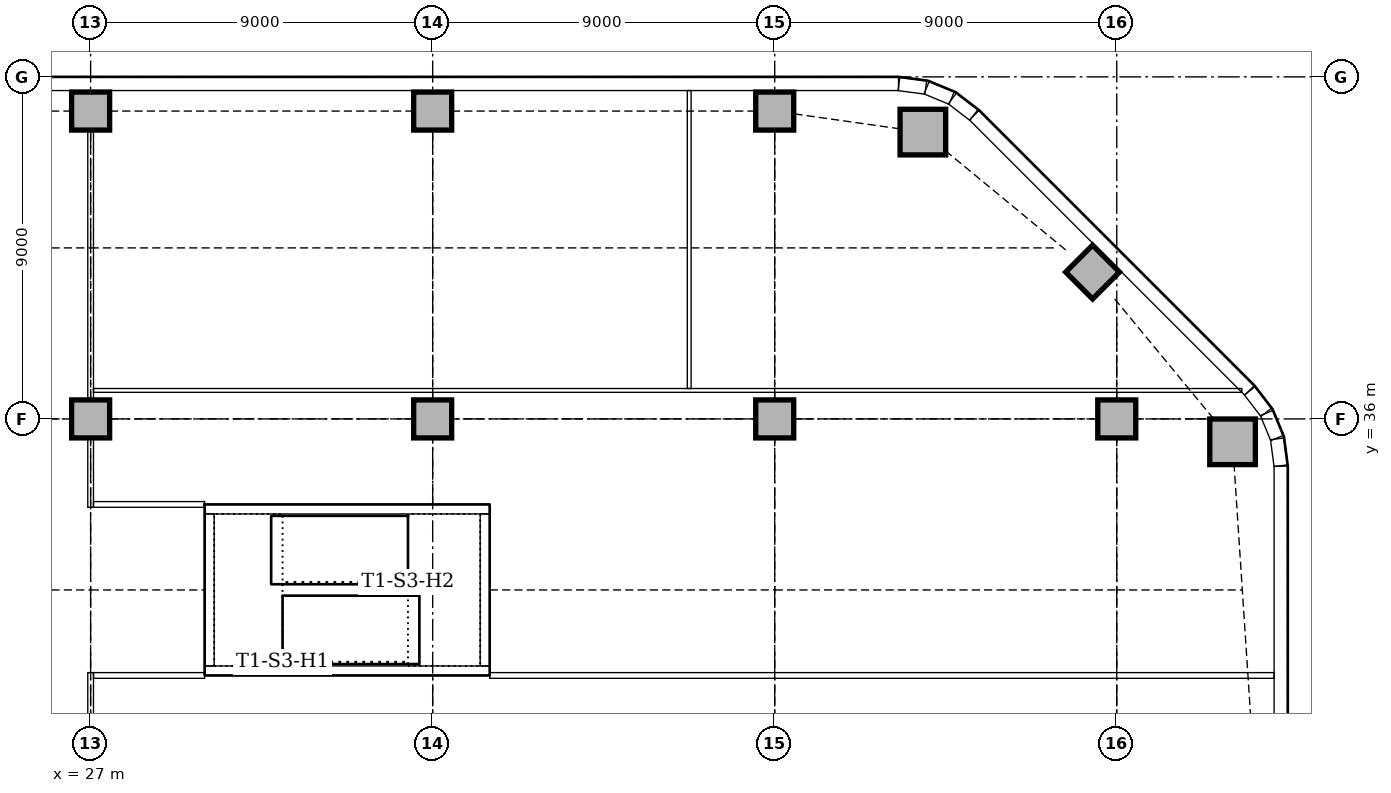
"""IFC4 building model, lengths in metres.
Left out: names, types, materials, properties, quantities, classifications, styles, units other than length and angle.
Written with IfcOpenShell. Run it as: python <this file> out.ifc"""

import sys

from ifc_helpers import new_model, si_unit, direction, frame, frame_2d, origin, origin_2d, place, context, subcontext, project, spatial, rectangle, extrude, element, fill, save


model = new_model("IFC4")
c1 = context("Model", 3, precision=1e-05, world=origin(), true_north=direction((0.0, 1.0)))
c2 = subcontext(c1, "Body", "Model", "MODEL_VIEW")
j1 = project(units=[si_unit("LENGTHUNIT", "METRE"), si_unit("PLANEANGLEUNIT", "RADIAN")], contexts=[c1])
p1 = place(None, origin())
s1 = spatial("IfcSite", under=j1, at=p1, CompositionType="ELEMENT")
p2 = place(p1, origin())
s2 = spatial("IfcBuilding", under=s1, at=p2, CompositionType="ELEMENT")
p3 = place(p2, frame((0.0, 0.0, 26.0)))
s3 = spatial("IfcBuildingStorey", under=s2, at=p3, CompositionType="ELEMENT", Elevation=26.0)
for number, where, z_axis, x_axis in (
    (1, (30.0, 29.375, 0.0), (0.0, 0.0, 1.0), (1.0, 0.0, 0.0)),
    (2, (37.5, 33.625, 0.0), (0.0, 0.0, 1.0), (-1.0, 0.0, 0.0)),
):
    element("IfcWall", number, at=place(p3, frame(where, z_axis=z_axis, x_axis=x_axis)), inside=s3, PredefinedType="SOLIDWALL", context=c2, shape_type="SweptSolid", body=[
        extrude(rectangle(XDim=7.5, YDim=0.25, at=frame_2d((3.75, 0.0))), origin(), (0.0, 0.0, 1.0), 4.0),
    ])
p4 = place(p3, frame((37.375, 29.5, 0.0), z_axis=(0.0, 0.0, 1.0), x_axis=(0.0, 1.0, 0.0)))
e3 = element("IfcWall", 3, at=p4, inside=s3, PredefinedType="SOLIDWALL", context=c2, shape_type="SweptSolid", body=[
    extrude(rectangle(XDim=4.0, YDim=0.25, at=frame_2d((2.0, 0.0))), origin(), (0.0, 0.0, 1.0), 4.0),
])
p5 = place(p3, frame((30.125, 33.5, 0.0), z_axis=(0.0, 0.0, 1.0), x_axis=(0.0, -1.0, 0.0)))
e4 = element("IfcWall", 4, at=p5, inside=s3, PredefinedType="SOLIDWALL", context=c2, shape_type="SweptSolid", body=[
    extrude(rectangle(XDim=4.0, YDim=0.25, at=frame_2d((2.0, 0.0))), origin(), (0.0, 0.0, 1.0), 4.0),
])
p6 = place(p5, frame((1.5, 0.0, 0.0)))
e5 = element("IfcOpeningElement", 5, at=p6, cuts=e4, PredefinedType="OPENING", context=c2, shape_type="SweptSolid", body=[
    extrude(rectangle(XDim=1.0, YDim=2.1, at=frame_2d((0.5, 1.05))), frame((0.0, 0.135, 0.0), z_axis=(0.0, -1.0, 0.0), x_axis=(1.0, 0.0, 0.0)), (0.0, 0.0, 1.0), 0.27),
])
for number, where, z_axis, x_axis in (
    (6, (57.047, 35.398, 0.0), (0.0, 0.0, 1.0), (1.0, 0.0, 0.0)),
    (7, (48.898, 43.547, 0.0), (0.0, 0.0, 1.0), (1.0, 0.0, 0.0)),
):
    element("IfcColumn", number, at=place(p3, frame(where, z_axis=z_axis, x_axis=x_axis)), inside=s3, PredefinedType="COLUMN", context=c2, shape_type="SweptSolid", body=[
        extrude(rectangle(XDim=1.2, YDim=1.2, at=origin_2d()), origin(), (0.0, 0.0, 1.0), 3.85),
    ])
for number, where, z_axis, x_axis in (
    (8, (53.364, 39.864, 0.0), (0.0, 0.0, 1.0), (0.707, 0.707, 0.0)),
    (9, (27.0, 44.1, 0.0), (0.0, 0.0, 1.0), (1.0, 0.0, 0.0)),
    (10, (36.0, 44.1, 0.0), (0.0, 0.0, 1.0), (1.0, 0.0, 0.0)),
    (11, (45.0, 44.1, 0.0), (0.0, 0.0, 1.0), (1.0, 0.0, 0.0)),
    (12, (27.0, 36.0, 0.0), (0.0, 0.0, 1.0), (1.0, 0.0, 0.0)),
    (13, (36.0, 36.0, 0.0), (0.0, 0.0, 1.0), (1.0, 0.0, 0.0)),
    (14, (45.0, 36.0, 0.0), (0.0, 0.0, 1.0), (1.0, 0.0, 0.0)),
    (15, (54.0, 36.0, 0.0), (0.0, 0.0, 1.0), (1.0, 0.0, 0.0)),
):
    element("IfcColumn", number, at=place(p3, frame(where, z_axis=z_axis, x_axis=x_axis)), inside=s3, PredefinedType="COLUMN", context=c2, shape_type="SweptSolid", body=[
        extrude(rectangle(XDim=1.0, YDim=1.0, at=origin_2d()), origin(), (0.0, 0.0, 1.0), 3.85),
    ])
p7 = place(p3, frame((58.32, 10.243, 0.0), z_axis=(0.0, 0.0, 1.0), x_axis=(0.0, 1.0, 0.0)))
e16 = element("IfcWall", 16, at=p7, inside=s3, PredefinedType="STANDARD", context=c2, shape_type="SweptSolid", body=[
    extrude(rectangle(XDim=24.515, YDim=0.36, at=frame_2d((12.257, 0.0))), origin(), (0.0, 0.0, 1.0), 3.85),
])
p8 = place(p7, frame((4.607, 0.0, 0.0)))
e17 = element("IfcOpeningElement", 17, at=p8, cuts=e16, PredefinedType="OPENING", context=c2, shape_type="SweptSolid", body=[
    extrude(rectangle(XDim=1.8, YDim=2.4, at=frame_2d((0.9, 1.2))), frame((0.0, 0.19, 0.0), z_axis=(0.0, -1.0, 0.0), x_axis=(1.0, 0.0, 0.0)), (0.0, 0.0, 1.0), 0.38),
])
p9 = place(p7, frame((8.757, 0.0, 0.9)))
e18 = element("IfcOpeningElement", 18, at=p9, cuts=e16, PredefinedType="OPENING", context=c2, shape_type="SweptSolid", body=[
    extrude(rectangle(XDim=1.8, YDim=1.6, at=frame_2d((0.9, 0.8))), frame((0.0, 0.19, 0.0), z_axis=(0.0, -1.0, 0.0), x_axis=(1.0, 0.0, 0.0)), (0.0, 0.0, 1.0), 0.38),
])
p10 = place(p7, frame((12.557, 0.0, 0.9)))
e19 = element("IfcOpeningElement", 19, at=p10, cuts=e16, PredefinedType="OPENING", context=c2, shape_type="SweptSolid", body=[
    extrude(rectangle(XDim=3.3, YDim=1.6, at=frame_2d((1.65, 0.8))), frame((0.0, 0.19, 0.0), z_axis=(0.0, -1.0, 0.0), x_axis=(1.0, 0.0, 0.0)), (0.0, 0.0, 1.0), 0.38),
])
p11 = place(p7, frame((17.357, 0.0, 0.9)))
e20 = element("IfcOpeningElement", 20, at=p11, cuts=e16, PredefinedType="OPENING", context=c2, shape_type="SweptSolid", body=[
    extrude(rectangle(XDim=3.3, YDim=1.6, at=frame_2d((1.65, 0.8))), frame((0.0, 0.19, 0.0), z_axis=(0.0, -1.0, 0.0), x_axis=(1.0, 0.0, 0.0)), (0.0, 0.0, 1.0), 0.38),
])
p12 = place(p3, frame((57.494, 36.751, 0.0), z_axis=(0.0, 0.0, 1.0), x_axis=(-0.707106781187, 0.707106781187, 0.0)))
e21 = element("IfcWall", 21, at=p12, inside=s3, PredefinedType="STANDARD", context=c2, shape_type="SweptSolid", body=[
    extrude(rectangle(XDim=10.243, YDim=0.36, at=frame_2d((5.121, 0.0))), origin(), (0.0, 0.0, 1.0), 3.85),
])
p13 = place(p12, frame((3.471, 0.0, 0.9)))
e22 = element("IfcOpeningElement", 22, at=p13, cuts=e21, PredefinedType="OPENING", context=c2, shape_type="SweptSolid", body=[
    extrude(rectangle(XDim=3.3, YDim=1.6, at=frame_2d((1.65, 0.8))), frame((0.0, 0.19, 0.0), z_axis=(0.0, -1.0, 0.0), x_axis=(1.0, 0.0, 0.0)), (0.0, 0.0, 1.0), 0.38),
])
p14 = place(p3, frame((48.257, 44.82, 0.0), z_axis=(0.0, 0.0, 1.0), x_axis=(-1.0, 0.0, 0.0)))
e23 = element("IfcWall", 23, at=p14, inside=s3, PredefinedType="STANDARD", context=c2, shape_type="SweptSolid", body=[
    extrude(rectangle(XDim=44.015, YDim=0.36, at=frame_2d((22.007, 0.0))), origin(), (0.0, 0.0, 1.0), 3.85),
])
p15 = place(p14, frame((2.057, 0.0, 0.9)))
e24 = element("IfcOpeningElement", 24, at=p15, cuts=e23, PredefinedType="OPENING", context=c2, shape_type="SweptSolid", body=[
    extrude(rectangle(XDim=3.3, YDim=1.6, at=frame_2d((1.65, 0.8))), frame((0.0, 0.19, 0.0), z_axis=(0.0, -1.0, 0.0), x_axis=(1.0, 0.0, 0.0)), (0.0, 0.0, 1.0), 0.38),
])
p16 = place(p14, frame((7.607, 0.0, 0.0)))
e25 = element("IfcOpeningElement", 25, at=p16, cuts=e23, PredefinedType="OPENING", context=c2, shape_type="SweptSolid", body=[
    extrude(rectangle(XDim=1.8, YDim=2.4, at=frame_2d((0.9, 1.2))), frame((0.0, 0.19, 0.0), z_axis=(0.0, -1.0, 0.0), x_axis=(1.0, 0.0, 0.0)), (0.0, 0.0, 1.0), 0.38),
])
p17 = place(p14, frame((11.357, 0.0, 0.9)))
e26 = element("IfcOpeningElement", 26, at=p17, cuts=e23, PredefinedType="OPENING", context=c2, shape_type="SweptSolid", body=[
    extrude(rectangle(XDim=3.3, YDim=1.6, at=frame_2d((1.65, 0.8))), frame((0.0, 0.19, 0.0), z_axis=(0.0, -1.0, 0.0), x_axis=(1.0, 0.0, 0.0)), (0.0, 0.0, 1.0), 0.38),
])
p18 = place(p14, frame((15.857, 0.0, 0.9)))
e27 = element("IfcOpeningElement", 27, at=p18, cuts=e23, PredefinedType="OPENING", context=c2, shape_type="SweptSolid", body=[
    extrude(rectangle(XDim=3.3, YDim=1.6, at=frame_2d((1.65, 0.8))), frame((0.0, 0.19, 0.0), z_axis=(0.0, -1.0, 0.0), x_axis=(1.0, 0.0, 0.0)), (0.0, 0.0, 1.0), 0.38),
])
p19 = place(p14, frame((20.357, 0.0, 0.9)))
e28 = element("IfcOpeningElement", 28, at=p19, cuts=e23, PredefinedType="OPENING", context=c2, shape_type="SweptSolid", body=[
    extrude(rectangle(XDim=3.3, YDim=1.6, at=frame_2d((1.65, 0.8))), frame((0.0, 0.19, 0.0), z_axis=(0.0, -1.0, 0.0), x_axis=(1.0, 0.0, 0.0)), (0.0, 0.0, 1.0), 0.38),
])
p20 = place(p14, frame((25.957, 0.0, 0.9)))
e29 = element("IfcOpeningElement", 29, at=p20, cuts=e23, PredefinedType="OPENING", context=c2, shape_type="SweptSolid", body=[
    extrude(rectangle(XDim=1.8, YDim=1.6, at=frame_2d((0.9, 0.8))), frame((0.0, 0.19, 0.0), z_axis=(0.0, -1.0, 0.0), x_axis=(1.0, 0.0, 0.0)), (0.0, 0.0, 1.0), 0.38),
])
p21 = place(p14, frame((29.357, 0.0, 0.9)))
e30 = element("IfcOpeningElement", 30, at=p21, cuts=e23, PredefinedType="OPENING", context=c2, shape_type="SweptSolid", body=[
    extrude(rectangle(XDim=3.3, YDim=1.6, at=frame_2d((1.65, 0.8))), frame((0.0, 0.19, 0.0), z_axis=(0.0, -1.0, 0.0), x_axis=(1.0, 0.0, 0.0)), (0.0, 0.0, 1.0), 0.38),
])
p22 = place(p14, frame((33.857, 0.0, 0.9)))
e31 = element("IfcOpeningElement", 31, at=p22, cuts=e23, PredefinedType="OPENING", context=c2, shape_type="SweptSolid", body=[
    extrude(rectangle(XDim=3.3, YDim=1.6, at=frame_2d((1.65, 0.8))), frame((0.0, 0.19, 0.0), z_axis=(0.0, -1.0, 0.0), x_axis=(1.0, 0.0, 0.0)), (0.0, 0.0, 1.0), 0.38),
])
p23 = place(p14, frame((38.357, 0.0, 0.9)))
e32 = element("IfcOpeningElement", 32, at=p23, cuts=e23, PredefinedType="OPENING", context=c2, shape_type="SweptSolid", body=[
    extrude(rectangle(XDim=3.3, YDim=1.6, at=frame_2d((1.65, 0.8))), frame((0.0, 0.19, 0.0), z_axis=(0.0, -1.0, 0.0), x_axis=(1.0, 0.0, 0.0)), (0.0, 0.0, 1.0), 0.38),
])
for number, where, z_axis, x_axis in (
    (33, (58.317, 34.769, 0.0), (0.0, 0.0, 1.0), (-0.131, 0.991, 0.0)),
    (34, (58.218, 35.497, 0.0), (0.0, 0.0, 1.0), (-0.383, 0.924, 0.0)),
):
    element("IfcWall", number, at=place(p3, frame(where, z_axis=z_axis, x_axis=x_axis)), inside=s3, PredefinedType="STANDARD", context=c2, shape_type="SweptSolid", body=[
        extrude(rectangle(XDim=0.713, YDim=0.36, at=frame_2d((0.356, 0.0))), origin(), (0.0, 0.0, 1.0), 3.85),
    ])
for number, where, z_axis, x_axis in (
    (35, (57.934, 36.175, 0.0), (0.0, 0.0, 1.0), (-0.609, 0.793, 0.0)),
    (36, (50.241, 44.0, 0.0), (0.0, 0.0, 1.0), (-0.793, 0.609, 0.0)),
):
    element("IfcWall", number, at=place(p3, frame(where, z_axis=z_axis, x_axis=x_axis)), inside=s3, PredefinedType="STANDARD", context=c2, shape_type="SweptSolid", body=[
        extrude(rectangle(XDim=0.713, YDim=0.36, at=frame_2d((0.357, 0.0))), origin(), (0.0, 0.0, 1.0), 3.85),
    ])
for number, where, z_axis, x_axis in (
    (37, (49.656, 44.445, 0.0), (0.0, 0.0, 1.0), (-0.924, 0.383, 0.0)),
    (38, (48.976, 44.724, 0.0), (0.0, 0.0, 1.0), (-0.991, 0.131, 0.0)),
):
    element("IfcWall", number, at=place(p3, frame(where, z_axis=z_axis, x_axis=x_axis)), inside=s3, PredefinedType="STANDARD", context=c2, shape_type="SweptSolid", body=[
        extrude(rectangle(XDim=0.713, YDim=0.36, at=frame_2d((0.356, 0.0))), origin(), (0.0, 0.0, 1.0), 3.85),
    ])
p24 = place(p3, frame((27.0, 33.675, 0.0), z_axis=(0.0, 0.0, 1.0), x_axis=(0.0, 1.0, 0.0)))
e39 = element("IfcWall", 39, at=p24, inside=s3, PredefinedType="PARTITIONING", context=c2, shape_type="SweptSolid", body=[
    extrude(rectangle(XDim=1.825, YDim=0.15, at=frame_2d((0.912, 0.0))), origin(), (0.0, 0.0, 1.0), 3.158),
])
p25 = place(p24, frame((0.4, 0.0, 0.0)))
e40 = element("IfcOpeningElement", 40, at=p25, cuts=e39, PredefinedType="OPENING", context=c2, shape_type="SweptSolid", body=[
    extrude(rectangle(XDim=1.0, YDim=2.1, at=frame_2d((0.5, 1.05))), frame((0.0, 0.085, 0.0), z_axis=(0.0, -1.0, 0.0), x_axis=(1.0, 0.0, 0.0)), (0.0, 0.0, 1.0), 0.17),
])
p26 = place(p3, frame((27.0, 36.5, 0.0), z_axis=(0.0, 0.0, 1.0), x_axis=(0.0, 1.0, 0.0)))
e41 = element("IfcWall", 41, at=p26, inside=s3, PredefinedType="PARTITIONING", context=c2, shape_type="SweptSolid", body=[
    extrude(rectangle(XDim=7.1, YDim=0.15, at=frame_2d((3.55, 0.0))), origin(), (0.0, 0.0, 1.0), 3.158),
])
p27 = place(p3, frame((27.0, 27.5, 0.0), z_axis=(0.0, 0.0, 1.0), x_axis=(0.0, 1.0, 0.0)))
e42 = element("IfcWall", 42, at=p27, inside=s3, PredefinedType="PARTITIONING", context=c2, shape_type="SweptSolid", body=[
    extrude(rectangle(XDim=1.825, YDim=0.15, at=frame_2d((0.912, 0.0))), origin(), (0.0, 0.0, 1.0), 3.158),
])
p28 = place(p27, frame((0.4, 0.0, 0.0)))
e43 = element("IfcOpeningElement", 43, at=p28, cuts=e42, PredefinedType="OPENING", context=c2, shape_type="SweptSolid", body=[
    extrude(rectangle(XDim=1.0, YDim=2.1, at=frame_2d((0.5, 1.05))), frame((0.0, 0.085, 0.0), z_axis=(0.0, -1.0, 0.0), x_axis=(1.0, 0.0, 0.0)), (0.0, 0.0, 1.0), 0.17),
])
for number, where, z_axis, x_axis in (
    (44, (27.075, 29.25, 0.0), (0.0, 0.0, 1.0), (1.0, 0.0, 0.0)),
    (45, (27.075, 33.75, 0.0), (0.0, 0.0, 1.0), (1.0, 0.0, 0.0)),
):
    element("IfcWall", number, at=place(p3, frame(where, z_axis=z_axis, x_axis=x_axis)), inside=s3, PredefinedType="PARTITIONING", context=c2, shape_type="SweptSolid", body=[
        extrude(rectangle(XDim=2.925, YDim=0.15, at=frame_2d((1.462, 0.0))), origin(), (0.0, 0.0, 1.0), 3.85),
    ])
p29 = place(p3, frame((37.5, 29.25, 0.0), z_axis=(0.0, 0.0, 1.0), x_axis=(1.0, 0.0, 0.0)))
e46 = element("IfcWall", 46, at=p29, inside=s3, PredefinedType="PARTITIONING", context=c2, shape_type="SweptSolid", body=[
    extrude(rectangle(XDim=20.64, YDim=0.15, at=frame_2d((10.32, 0.0))), origin(), (0.0, 0.0, 1.0), 3.85),
])
p30 = place(p3, frame((27.075, 36.75, 0.0), z_axis=(0.0, 0.0, 1.0), x_axis=(1.0, 0.0, 0.0)))
e47 = element("IfcWall", 47, at=p30, inside=s3, PredefinedType="PARTITIONING", context=c2, shape_type="SweptSolid", body=[
    extrude(rectangle(XDim=30.216, YDim=0.1, at=frame_2d((15.108, 0.0))), origin(), (0.0, 0.0, 1.0), 3.85),
])
p31 = place(p30, frame((7.45, 0.0, 0.0)))
e48 = element("IfcOpeningElement", 48, at=p31, cuts=e47, PredefinedType="OPENING", context=c2, shape_type="SweptSolid", body=[
    extrude(rectangle(XDim=0.9, YDim=2.1, at=frame_2d((0.45, 1.05))), frame((0.0, 0.06, 0.0), z_axis=(0.0, -1.0, 0.0), x_axis=(1.0, 0.0, 0.0)), (0.0, 0.0, 1.0), 0.12),
])
p32 = place(p30, frame((22.425, 0.0, 0.0)))
e49 = element("IfcOpeningElement", 49, at=p32, cuts=e47, PredefinedType="OPENING", context=c2, shape_type="SweptSolid", body=[
    extrude(rectangle(XDim=0.9, YDim=2.1, at=frame_2d((0.45, 1.05))), frame((0.0, 0.06, 0.0), z_axis=(0.0, -1.0, 0.0), x_axis=(1.0, 0.0, 0.0)), (0.0, 0.0, 1.0), 0.12),
])
p33 = place(p3, frame((42.75, 36.8, 0.0), z_axis=(0.0, 0.0, 1.0), x_axis=(0.0, 1.0, 0.0)))
e50 = element("IfcWall", 50, at=p33, inside=s3, PredefinedType="PARTITIONING", context=c2, shape_type="SweptSolid", body=[
    extrude(rectangle(XDim=7.84, YDim=0.1, at=frame_2d((3.92, 0.0))), origin(), (0.0, 0.0, 1.0), 3.85),
])
p34 = place(p11, origin())
e51 = element("IfcWindow", 51, at=p34, inside=s3, PartitioningType="SINGLE_PANEL", PredefinedType="WINDOW", context=c2, shape_type="SweptSolid", body=[
    extrude(rectangle(XDim=3.3, YDim=1.6, at=frame_2d((1.65, 0.8))), frame((0.0, 0.13, 0.0), z_axis=(0.0, -1.0, 0.0), x_axis=(1.0, 0.0, 0.0)), (0.0, 0.0, 1.0), 0.06),
])
fill(e20, e51)
p35 = place(p13, origin())
e52 = element("IfcWindow", 52, at=p35, inside=s3, PartitioningType="SINGLE_PANEL", PredefinedType="WINDOW", context=c2, shape_type="SweptSolid", body=[
    extrude(rectangle(XDim=3.3, YDim=1.6, at=frame_2d((1.65, 0.8))), frame((0.0, 0.13, 0.0), z_axis=(0.0, -1.0, 0.0), x_axis=(1.0, 0.0, 0.0)), (0.0, 0.0, 1.0), 0.06),
])
fill(e22, e52)
p36 = place(p15, origin())
e53 = element("IfcWindow", 53, at=p36, inside=s3, PartitioningType="SINGLE_PANEL", PredefinedType="WINDOW", context=c2, shape_type="SweptSolid", body=[
    extrude(rectangle(XDim=3.3, YDim=1.6, at=frame_2d((1.65, 0.8))), frame((0.0, 0.13, 0.0), z_axis=(0.0, -1.0, 0.0), x_axis=(1.0, 0.0, 0.0)), (0.0, 0.0, 1.0), 0.06),
])
fill(e24, e53)
p37 = place(p16, frame((1.8, 0.0, 0.0), z_axis=(0.0, 0.0, 1.0), x_axis=(-1.0, 0.0, 0.0)))
e54 = element("IfcDoor", 54, at=p37, inside=s3, OperationType="DOUBLE_DOOR_SINGLE_SWING", PredefinedType="DOOR", context=c2, shape_type="SweptSolid", body=[
    extrude(rectangle(XDim=1.8, YDim=2.4, at=frame_2d((0.9, 1.2))), frame((0.0, -0.07, 0.0), z_axis=(0.0, -1.0, 0.0), x_axis=(1.0, 0.0, 0.0)), (0.0, 0.0, 1.0), 0.05),
])
fill(e25, e54)
p38 = place(p17, origin())
e55 = element("IfcWindow", 55, at=p38, inside=s3, PartitioningType="SINGLE_PANEL", PredefinedType="WINDOW", context=c2, shape_type="SweptSolid", body=[
    extrude(rectangle(XDim=3.3, YDim=1.6, at=frame_2d((1.65, 0.8))), frame((0.0, 0.13, 0.0), z_axis=(0.0, -1.0, 0.0), x_axis=(1.0, 0.0, 0.0)), (0.0, 0.0, 1.0), 0.06),
])
fill(e26, e55)
p39 = place(p18, origin())
e56 = element("IfcWindow", 56, at=p39, inside=s3, PartitioningType="SINGLE_PANEL", PredefinedType="WINDOW", context=c2, shape_type="SweptSolid", body=[
    extrude(rectangle(XDim=3.3, YDim=1.6, at=frame_2d((1.65, 0.8))), frame((0.0, 0.13, 0.0), z_axis=(0.0, -1.0, 0.0), x_axis=(1.0, 0.0, 0.0)), (0.0, 0.0, 1.0), 0.06),
])
fill(e27, e56)
p40 = place(p19, origin())
e57 = element("IfcWindow", 57, at=p40, inside=s3, PartitioningType="SINGLE_PANEL", PredefinedType="WINDOW", context=c2, shape_type="SweptSolid", body=[
    extrude(rectangle(XDim=3.3, YDim=1.6, at=frame_2d((1.65, 0.8))), frame((0.0, 0.13, 0.0), z_axis=(0.0, -1.0, 0.0), x_axis=(1.0, 0.0, 0.0)), (0.0, 0.0, 1.0), 0.06),
])
fill(e28, e57)
p41 = place(p6, origin())
e58 = element("IfcDoor", 58, at=p41, inside=s3, OperationType="SINGLE_SWING_LEFT", PredefinedType="DOOR", context=c2, shape_type="SweptSolid", body=[
    extrude(rectangle(XDim=1.0, YDim=2.1, at=frame_2d((0.5, 1.05))), frame((0.0, 0.025, 0.0), z_axis=(0.0, -1.0, 0.0), x_axis=(1.0, 0.0, 0.0)), (0.0, 0.0, 1.0), 0.05),
])
fill(e5, e58)
p42 = place(p25, frame((1.0, 0.0, 0.0), z_axis=(0.0, 0.0, 1.0), x_axis=(-1.0, 0.0, 0.0)))
e59 = element("IfcDoor", 59, at=p42, inside=s3, OperationType="SINGLE_SWING_RIGHT", PredefinedType="DOOR", context=c2, shape_type="SweptSolid", body=[
    extrude(rectangle(XDim=1.0, YDim=2.1, at=frame_2d((0.5, 1.05))), frame((0.0, 0.025, 0.0), z_axis=(0.0, -1.0, 0.0), x_axis=(1.0, 0.0, 0.0)), (0.0, 0.0, 1.0), 0.05),
])
fill(e40, e59)
p43 = place(p31, origin())
e60 = element("IfcDoor", 60, at=p43, inside=s3, OperationType="SINGLE_SWING_RIGHT", PredefinedType="DOOR", context=c2, shape_type="SweptSolid", body=[
    extrude(rectangle(XDim=0.9, YDim=2.1, at=frame_2d((0.45, 1.05))), frame((0.0, 0.025, 0.0), z_axis=(0.0, -1.0, 0.0), x_axis=(1.0, 0.0, 0.0)), (0.0, 0.0, 1.0), 0.05),
])
fill(e48, e60)
p44 = place(p32, origin())
e61 = element("IfcDoor", 61, at=p44, inside=s3, OperationType="SINGLE_SWING_LEFT", PredefinedType="DOOR", context=c2, shape_type="SweptSolid", body=[
    extrude(rectangle(XDim=0.9, YDim=2.1, at=frame_2d((0.45, 1.05))), frame((0.0, 0.025, 0.0), z_axis=(0.0, -1.0, 0.0), x_axis=(1.0, 0.0, 0.0)), (0.0, 0.0, 1.0), 0.05),
])
fill(e49, e61)
p45 = place(p28, frame((1.0, 0.0, 0.0), z_axis=(0.0, 0.0, 1.0), x_axis=(-1.0, 0.0, 0.0)))
e62 = element("IfcDoor", 62, at=p45, inside=s3, OperationType="SINGLE_SWING_LEFT", PredefinedType="DOOR", context=c2, shape_type="SweptSolid", body=[
    extrude(rectangle(XDim=1.0, YDim=2.1, at=frame_2d((0.5, 1.05))), frame((0.0, 0.025, 0.0), z_axis=(0.0, -1.0, 0.0), x_axis=(1.0, 0.0, 0.0)), (0.0, 0.0, 1.0), 0.05),
])
fill(e43, e62)
save(model, sys.argv[1])
